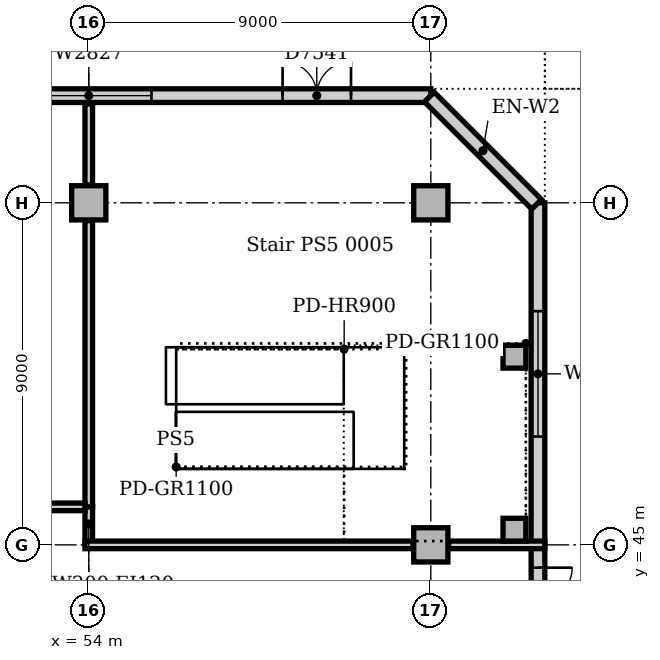
"""IFC4 building model, lengths in metres.
Left out: names, types, materials, properties, quantities, classifications, styles, units other than length and angle.
Written with IfcOpenShell. Run it as: python <this file> out.ifc"""

import sys

from ifc_helpers import new_model, si_unit, direction, frame, frame_2d, origin, origin_2d, place, context, subcontext, project, spatial, rectangle, extrude, element, fill, save


model = new_model("IFC4")
c1 = context("Model", 3, precision=1e-05, world=origin(), true_north=direction((0.0, 1.0)))
c2 = subcontext(c1, "Body", "Model", "MODEL_VIEW")
j1 = project(units=[si_unit("LENGTHUNIT", "METRE"), si_unit("PLANEANGLEUNIT", "RADIAN")], contexts=[c1])
p1 = place(None, origin())
s1 = spatial("IfcSite", under=j1, at=p1, CompositionType="ELEMENT")
p2 = place(p1, origin())
s2 = spatial("IfcBuilding", under=s1, at=p2, CompositionType="ELEMENT")
p3 = place(p2, origin())
s3 = spatial("IfcBuildingStorey", under=s2, at=p3, CompositionType="ELEMENT", Elevation=0.0)
for number, where, z_axis, x_axis in (
    (1, (54.0, 54.0, 0.0), (0.0, 0.0, 1.0), (1.0, 0.0, 0.0)),
    (2, (63.0, 45.0, 0.0), (0.0, 0.0, 1.0), (1.0, 0.0, 0.0)),
    (3, (63.0, 54.0, 0.0), (0.0, 0.0, 1.0), (1.0, 0.0, 0.0)),
):
    element("IfcColumn", number, at=place(p3, frame(where, z_axis=z_axis, x_axis=x_axis)), inside=s3, PredefinedType="COLUMN", context=c2, shape_type="SweptSolid", body=[
        extrude(rectangle(XDim=0.9, YDim=0.9, at=origin_2d()), origin(), (0.0, 0.0, 1.0), 5.7),
    ])
p4 = place(p3, frame((65.82, -9.0, 0.0), z_axis=(0.0, 0.0, 1.0), x_axis=(0.0, 1.0, 0.0)))
e4 = element("IfcWall", 4, at=p4, inside=s3, PredefinedType="STANDARD", context=c2, shape_type="SweptSolid", body=[
    extrude(rectangle(XDim=63.0, YDim=0.36, at=frame_2d((31.5, 0.0))), origin(), (0.0, 0.0, 1.0), 5.7),
])
p5 = place(p4, frame((30.6, 0.0, 0.0)))
e5 = element("IfcOpeningElement", 5, at=p5, cuts=e4, PredefinedType="OPENING", context=c2, shape_type="SweptSolid", body=[
    extrude(rectangle(XDim=1.8, YDim=2.2, at=frame_2d((0.9, 1.1))), frame((0.0, 0.19, 0.0), z_axis=(0.0, -1.0, 0.0), x_axis=(1.0, 0.0, 0.0)), (0.0, 0.0, 1.0), 0.38),
])
p6 = place(p4, frame((51.6, 0.0, 0.0)))
e6 = element("IfcOpeningElement", 6, at=p6, cuts=e4, PredefinedType="OPENING", context=c2, shape_type="SweptSolid", body=[
    extrude(rectangle(XDim=1.8, YDim=2.2, at=frame_2d((0.9, 1.1))), frame((0.0, 0.19, 0.0), z_axis=(0.0, -1.0, 0.0), x_axis=(1.0, 0.0, 0.0)), (0.0, 0.0, 1.0), 0.38),
])
p7 = place(p4, frame((9.6, 0.0, 0.0)))
e7 = element("IfcOpeningElement", 7, at=p7, cuts=e4, PredefinedType="OPENING", context=c2, shape_type="SweptSolid", body=[
    extrude(rectangle(XDim=2.4, YDim=2.2, at=frame_2d((1.2, 1.1))), frame((0.0, 0.19, 0.0), z_axis=(0.0, -1.0, 0.0), x_axis=(1.0, 0.0, 0.0)), (0.0, 0.0, 1.0), 0.38),
])
p8 = place(p4, frame((2.85, 0.0, 0.6)))
e8 = element("IfcOpeningElement", 8, at=p8, cuts=e4, PredefinedType="OPENING", context=c2, shape_type="SweptSolid", body=[
    extrude(rectangle(XDim=3.3, YDim=3.0, at=frame_2d((1.65, 1.5))), frame((0.0, 0.19, 0.0), z_axis=(0.0, -1.0, 0.0), x_axis=(1.0, 0.0, 0.0)), (0.0, 0.0, 1.0), 0.38),
])
p9 = place(p4, frame((16.35, 0.0, 0.6)))
e9 = element("IfcOpeningElement", 9, at=p9, cuts=e4, PredefinedType="OPENING", context=c2, shape_type="SweptSolid", body=[
    extrude(rectangle(XDim=3.3, YDim=3.0, at=frame_2d((1.65, 1.5))), frame((0.0, 0.19, 0.0), z_axis=(0.0, -1.0, 0.0), x_axis=(1.0, 0.0, 0.0)), (0.0, 0.0, 1.0), 0.38),
])
p10 = place(p4, frame((20.85, 0.0, 0.6)))
e10 = element("IfcOpeningElement", 10, at=p10, cuts=e4, PredefinedType="OPENING", context=c2, shape_type="SweptSolid", body=[
    extrude(rectangle(XDim=3.3, YDim=3.0, at=frame_2d((1.65, 1.5))), frame((0.0, 0.19, 0.0), z_axis=(0.0, -1.0, 0.0), x_axis=(1.0, 0.0, 0.0)), (0.0, 0.0, 1.0), 0.38),
])
p11 = place(p4, frame((25.35, 0.0, 0.6)))
e11 = element("IfcOpeningElement", 11, at=p11, cuts=e4, PredefinedType="OPENING", context=c2, shape_type="SweptSolid", body=[
    extrude(rectangle(XDim=3.3, YDim=3.0, at=frame_2d((1.65, 1.5))), frame((0.0, 0.19, 0.0), z_axis=(0.0, -1.0, 0.0), x_axis=(1.0, 0.0, 0.0)), (0.0, 0.0, 1.0), 0.38),
])
p12 = place(p4, frame((34.35, 0.0, 0.6)))
e12 = element("IfcOpeningElement", 12, at=p12, cuts=e4, PredefinedType="OPENING", context=c2, shape_type="SweptSolid", body=[
    extrude(rectangle(XDim=3.3, YDim=3.0, at=frame_2d((1.65, 1.5))), frame((0.0, 0.19, 0.0), z_axis=(0.0, -1.0, 0.0), x_axis=(1.0, 0.0, 0.0)), (0.0, 0.0, 1.0), 0.38),
])
p13 = place(p4, frame((38.85, 0.0, 0.6)))
e13 = element("IfcOpeningElement", 13, at=p13, cuts=e4, PredefinedType="OPENING", context=c2, shape_type="SweptSolid", body=[
    extrude(rectangle(XDim=3.3, YDim=3.0, at=frame_2d((1.65, 1.5))), frame((0.0, 0.19, 0.0), z_axis=(0.0, -1.0, 0.0), x_axis=(1.0, 0.0, 0.0)), (0.0, 0.0, 1.0), 0.38),
])
p14 = place(p4, frame((43.35, 0.0, 0.6)))
e14 = element("IfcOpeningElement", 14, at=p14, cuts=e4, PredefinedType="OPENING", context=c2, shape_type="SweptSolid", body=[
    extrude(rectangle(XDim=3.3, YDim=3.0, at=frame_2d((1.65, 1.5))), frame((0.0, 0.19, 0.0), z_axis=(0.0, -1.0, 0.0), x_axis=(1.0, 0.0, 0.0)), (0.0, 0.0, 1.0), 0.38),
])
p15 = place(p4, frame((47.85, 0.0, 0.6)))
e15 = element("IfcOpeningElement", 15, at=p15, cuts=e4, PredefinedType="OPENING", context=c2, shape_type="SweptSolid", body=[
    extrude(rectangle(XDim=3.3, YDim=3.0, at=frame_2d((1.65, 1.5))), frame((0.0, 0.19, 0.0), z_axis=(0.0, -1.0, 0.0), x_axis=(1.0, 0.0, 0.0)), (0.0, 0.0, 1.0), 0.38),
])
p16 = place(p4, frame((56.85, 0.0, 0.6)))
e16 = element("IfcOpeningElement", 16, at=p16, cuts=e4, PredefinedType="OPENING", context=c2, shape_type="SweptSolid", body=[
    extrude(rectangle(XDim=3.3, YDim=3.0, at=frame_2d((1.65, 1.5))), frame((0.0, 0.19, 0.0), z_axis=(0.0, -1.0, 0.0), x_axis=(1.0, 0.0, 0.0)), (0.0, 0.0, 1.0), 0.38),
])
p17 = place(p3, frame((63.0, 56.82, 0.0), z_axis=(0.0, 0.0, 1.0), x_axis=(-1.0, 0.0, 0.0)))
e17 = element("IfcWall", 17, at=p17, inside=s3, PredefinedType="STANDARD", context=c2, shape_type="SweptSolid", body=[
    extrude(rectangle(XDim=57.4, YDim=0.36, at=frame_2d((28.7, 0.0))), origin(), (0.0, 0.0, 1.0), 5.7),
])
p18 = place(p17, frame((32.55, 0.0, 0.0)))
e18 = element("IfcOpeningElement", 18, at=p18, cuts=e17, PredefinedType="OPENING", context=c2, shape_type="SweptSolid", body=[
    extrude(rectangle(XDim=2.4, YDim=2.4, at=frame_2d((1.2, 1.2))), frame((0.0, 0.19, 0.0), z_axis=(0.0, -1.0, 0.0), x_axis=(1.0, 0.0, 0.0)), (0.0, 0.0, 1.0), 0.38),
])
p19 = place(p17, frame((48.3, 0.0, 0.0)))
e19 = element("IfcOpeningElement", 19, at=p19, cuts=e17, PredefinedType="OPENING", context=c2, shape_type="SweptSolid", body=[
    extrude(rectangle(XDim=2.4, YDim=2.2, at=frame_2d((1.2, 1.1))), frame((0.0, 0.19, 0.0), z_axis=(0.0, -1.0, 0.0), x_axis=(1.0, 0.0, 0.0)), (0.0, 0.0, 1.0), 0.38),
])
p20 = place(p17, frame((39.3, 0.0, 0.0)))
e20 = element("IfcOpeningElement", 20, at=p20, cuts=e17, PredefinedType="OPENING", context=c2, shape_type="SweptSolid", body=[
    extrude(rectangle(XDim=2.4, YDim=2.2, at=frame_2d((1.2, 1.1))), frame((0.0, 0.19, 0.0), z_axis=(0.0, -1.0, 0.0), x_axis=(1.0, 0.0, 0.0)), (0.0, 0.0, 1.0), 0.38),
])
p21 = place(p17, frame((12.3, 0.0, 0.0)))
e21 = element("IfcOpeningElement", 21, at=p21, cuts=e17, PredefinedType="OPENING", context=c2, shape_type="SweptSolid", body=[
    extrude(rectangle(XDim=2.4, YDim=2.2, at=frame_2d((1.2, 1.1))), frame((0.0, 0.19, 0.0), z_axis=(0.0, -1.0, 0.0), x_axis=(1.0, 0.0, 0.0)), (0.0, 0.0, 1.0), 0.38),
])
p22 = place(p17, frame((21.6, 0.0, 0.0)))
e22 = element("IfcOpeningElement", 22, at=p22, cuts=e17, PredefinedType="OPENING", context=c2, shape_type="SweptSolid", body=[
    extrude(rectangle(XDim=1.8, YDim=2.2, at=frame_2d((0.9, 1.1))), frame((0.0, 0.19, 0.0), z_axis=(0.0, -1.0, 0.0), x_axis=(1.0, 0.0, 0.0)), (0.0, 0.0, 1.0), 0.38),
])
p23 = place(p17, frame((2.1, 0.0, 0.0)))
e23 = element("IfcOpeningElement", 23, at=p23, cuts=e17, PredefinedType="OPENING", context=c2, shape_type="SweptSolid", body=[
    extrude(rectangle(XDim=1.8, YDim=2.2, at=frame_2d((0.9, 1.1))), frame((0.0, 0.19, 0.0), z_axis=(0.0, -1.0, 0.0), x_axis=(1.0, 0.0, 0.0)), (0.0, 0.0, 1.0), 0.38),
])
p24 = place(p17, frame((7.35, 0.0, 0.6)))
e24 = element("IfcOpeningElement", 24, at=p24, cuts=e17, PredefinedType="OPENING", context=c2, shape_type="SweptSolid", body=[
    extrude(rectangle(XDim=3.3, YDim=3.0, at=frame_2d((1.65, 1.5))), frame((0.0, 0.19, 0.0), z_axis=(0.0, -1.0, 0.0), x_axis=(1.0, 0.0, 0.0)), (0.0, 0.0, 1.0), 0.38),
])
p25 = place(p17, frame((16.35, 0.0, 0.6)))
e25 = element("IfcOpeningElement", 25, at=p25, cuts=e17, PredefinedType="OPENING", context=c2, shape_type="SweptSolid", body=[
    extrude(rectangle(XDim=3.3, YDim=3.0, at=frame_2d((1.65, 1.5))), frame((0.0, 0.19, 0.0), z_axis=(0.0, -1.0, 0.0), x_axis=(1.0, 0.0, 0.0)), (0.0, 0.0, 1.0), 0.38),
])
p26 = place(p17, frame((25.35, 0.0, 0.6)))
e26 = element("IfcOpeningElement", 26, at=p26, cuts=e17, PredefinedType="OPENING", context=c2, shape_type="SweptSolid", body=[
    extrude(rectangle(XDim=3.3, YDim=3.0, at=frame_2d((1.65, 1.5))), frame((0.0, 0.19, 0.0), z_axis=(0.0, -1.0, 0.0), x_axis=(1.0, 0.0, 0.0)), (0.0, 0.0, 1.0), 0.38),
])
p27 = place(p17, frame((43.35, 0.0, 0.6)))
e27 = element("IfcOpeningElement", 27, at=p27, cuts=e17, PredefinedType="OPENING", context=c2, shape_type="SweptSolid", body=[
    extrude(rectangle(XDim=3.3, YDim=3.0, at=frame_2d((1.65, 1.5))), frame((0.0, 0.19, 0.0), z_axis=(0.0, -1.0, 0.0), x_axis=(1.0, 0.0, 0.0)), (0.0, 0.0, 1.0), 0.38),
])
p28 = place(p17, frame((52.35, 0.0, 0.6)))
e28 = element("IfcOpeningElement", 28, at=p28, cuts=e17, PredefinedType="OPENING", context=c2, shape_type="SweptSolid", body=[
    extrude(rectangle(XDim=3.3, YDim=3.0, at=frame_2d((1.65, 1.5))), frame((0.0, 0.19, 0.0), z_axis=(0.0, -1.0, 0.0), x_axis=(1.0, 0.0, 0.0)), (0.0, 0.0, 1.0), 0.38),
])
p29 = place(p3, frame((65.784, 53.961, 0.0), z_axis=(0.0, 0.0, 1.0), x_axis=(-0.707106781187, 0.707106781187, 0.0)))
e29 = element("IfcWall", 29, at=p29, inside=s3, PredefinedType="STANDARD", context=c2, shape_type="SweptSolid", body=[
    extrude(rectangle(XDim=3.993, YDim=0.36, at=frame_2d((1.996, 0.0))), origin(), (0.0, 0.0, 1.0), 5.7),
])
for number, where, z_axis, x_axis in (
    (30, (65.2, 49.95, 0.0), (0.0, 0.0, 1.0), (1.0, 0.0, 0.0)),
    (31, (65.2, 45.4, 0.0), (0.0, 0.0, 1.0), (1.0, 0.0, 0.0)),
):
    element("IfcColumn", number, at=place(p3, frame(where, z_axis=z_axis, x_axis=x_axis)), inside=s3, PredefinedType="COLUMN", context=c2, shape_type="SweptSolid", body=[
        extrude(rectangle(XDim=0.6, YDim=0.6, at=origin_2d()), origin(), (0.0, 0.0, 1.0), 6.0),
    ])
p30 = place(p3, frame((54.0, 45.1, 0.0), z_axis=(0.0, 0.0, 1.0), x_axis=(0.0, 1.0, 0.0)))
e32 = element("IfcWall", 32, at=p30, inside=s3, PredefinedType="SOLIDWALL", context=c2, shape_type="SweptSolid", body=[
    extrude(rectangle(XDim=0.9, YDim=0.2, at=frame_2d((0.45, 0.0))), origin(), (0.0, 0.0, 1.0), 5.7),
])
p31 = place(p3, frame((53.9, 45.0, 0.0), z_axis=(0.0, 0.0, 1.0), x_axis=(1.0, 0.0, 0.0)))
e33 = element("IfcWall", 33, at=p31, inside=s3, PredefinedType="SOLIDWALL", context=c2, shape_type="SweptSolid", body=[
    extrude(rectangle(XDim=8.63, YDim=0.2, at=frame_2d((4.315, 0.0))), origin(), (0.0, 0.0, 1.0), 5.7),
])
p32 = place(p3, frame((63.47, 45.0, 0.0), z_axis=(0.0, 0.0, 1.0), x_axis=(1.0, 0.0, 0.0)))
e34 = element("IfcWall", 34, at=p32, inside=s3, PredefinedType="SOLIDWALL", context=c2, shape_type="SweptSolid", body=[
    extrude(rectangle(XDim=2.53, YDim=0.2, at=frame_2d((1.265, 0.0))), origin(), (0.0, 0.0, 1.0), 5.7),
])
p33 = place(p3, frame((54.0, 46.0, 0.0), z_axis=(0.0, 0.0, 1.0), x_axis=(0.0, 1.0, 0.0)))
e35 = element("IfcWall", 35, at=p33, inside=s3, PredefinedType="SOLIDWALL", context=c2, shape_type="SweptSolid", body=[
    extrude(rectangle(XDim=7.53, YDim=0.2, at=frame_2d((3.765, 0.0))), origin(), (0.0, 0.0, 1.0), 5.7),
])
p34 = place(p3, frame((54.0, 54.47, 0.0), z_axis=(0.0, 0.0, 1.0), x_axis=(0.0, 1.0, 0.0)))
e36 = element("IfcWall", 36, at=p34, inside=s3, PredefinedType="SOLIDWALL", context=c2, shape_type="SweptSolid", body=[
    extrude(rectangle(XDim=2.13, YDim=0.2, at=frame_2d((1.065, 0.0))), origin(), (0.0, 0.0, 1.0), 5.7),
])
p35 = place(p3, frame((45.1, 46.0, 0.0), z_axis=(0.0, 0.0, 1.0), x_axis=(1.0, 0.0, 0.0)))
e37 = element("IfcWall", 37, at=p35, inside=s3, PredefinedType="PARTITIONING", context=c2, shape_type="SweptSolid", body=[
    extrude(rectangle(XDim=8.8, YDim=0.2, at=frame_2d((4.4, 0.0))), origin(), (0.0, 0.0, 1.0), 5.7),
])
p36 = place(p35, frame((3.9, 0.0, 0.0)))
e38 = element("IfcOpeningElement", 38, at=p36, cuts=e37, PredefinedType="OPENING", context=c2, shape_type="SweptSolid", body=[
    extrude(rectangle(XDim=1.0, YDim=2.1, at=frame_2d((0.5, 1.05))), frame((0.0, 0.11, 0.0), z_axis=(0.0, -1.0, 0.0), x_axis=(1.0, 0.0, 0.0)), (0.0, 0.0, 1.0), 0.22),
])
p37 = place(p6, frame((1.8, 0.0, 0.0), z_axis=(0.0, 0.0, 1.0), x_axis=(-1.0, 0.0, 0.0)))
e39 = element("IfcDoor", 39, at=p37, inside=s3, OperationType="DOUBLE_DOOR_SINGLE_SWING", PredefinedType="DOOR", context=c2, shape_type="SweptSolid", body=[
    extrude(rectangle(XDim=1.8, YDim=2.2, at=frame_2d((0.9, 1.1))), frame((0.0, -0.07, 0.0), z_axis=(0.0, -1.0, 0.0), x_axis=(1.0, 0.0, 0.0)), (0.0, 0.0, 1.0), 0.05),
])
fill(e6, e39)
p38 = place(p16, origin())
e40 = element("IfcWindow", 40, at=p38, inside=s3, PartitioningType="SINGLE_PANEL", PredefinedType="WINDOW", context=c2, shape_type="SweptSolid", body=[
    extrude(rectangle(XDim=3.3, YDim=3.0, at=frame_2d((1.65, 1.5))), frame((0.0, 0.13, 0.0), z_axis=(0.0, -1.0, 0.0), x_axis=(1.0, 0.0, 0.0)), (0.0, 0.0, 1.0), 0.06),
])
fill(e16, e40)
p39 = place(p23, frame((1.8, 0.0, 0.0), z_axis=(0.0, 0.0, 1.0), x_axis=(-1.0, 0.0, 0.0)))
e41 = element("IfcDoor", 41, at=p39, inside=s3, OperationType="DOUBLE_DOOR_SINGLE_SWING", PredefinedType="DOOR", context=c2, shape_type="SweptSolid", body=[
    extrude(rectangle(XDim=1.8, YDim=2.2, at=frame_2d((0.9, 1.1))), frame((0.0, -0.07, 0.0), z_axis=(0.0, -1.0, 0.0), x_axis=(1.0, 0.0, 0.0)), (0.0, 0.0, 1.0), 0.05),
])
fill(e23, e41)
p40 = place(p24, origin())
e42 = element("IfcWindow", 42, at=p40, inside=s3, PartitioningType="SINGLE_PANEL", PredefinedType="WINDOW", context=c2, shape_type="SweptSolid", body=[
    extrude(rectangle(XDim=3.3, YDim=3.0, at=frame_2d((1.65, 1.5))), frame((0.0, 0.13, 0.0), z_axis=(0.0, -1.0, 0.0), x_axis=(1.0, 0.0, 0.0)), (0.0, 0.0, 1.0), 0.06),
])
fill(e24, e42)
save(model, sys.argv[1])
